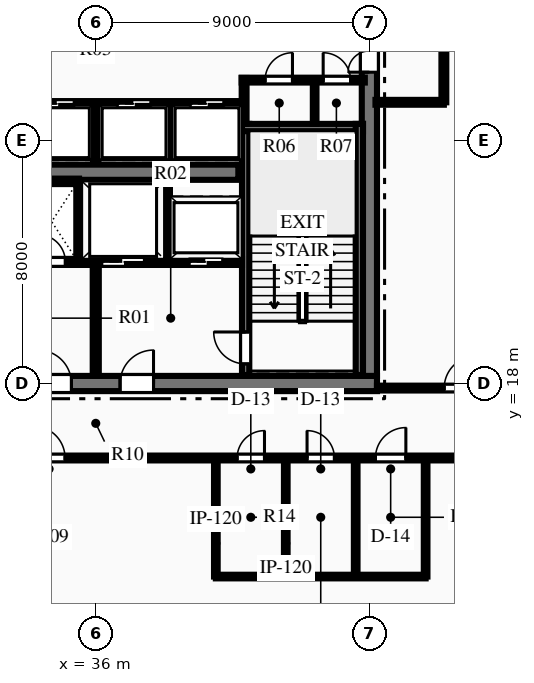
"""IFC4 building model, lengths in metres.
Left out: names, types, materials, properties, quantities, classifications, styles, units other than length and angle.
Written with IfcOpenShell. Run it as: python <this file> out.ifc"""

import sys

from ifc_helpers import new_model, si_unit, direction, frame, frame_2d, origin, place, context, subcontext, project, spatial, rectangle, extrude, element, fill, save


model = new_model("IFC4")
c1 = context("Model", 3, precision=1e-05, world=origin(), true_north=direction((0.0, 1.0)))
c2 = subcontext(c1, "Body", "Model", "MODEL_VIEW")
j1 = project(units=[si_unit("LENGTHUNIT", "METRE"), si_unit("PLANEANGLEUNIT", "RADIAN")], contexts=[c1])
p1 = place(None, origin())
s1 = spatial("IfcSite", under=j1, at=p1, CompositionType="ELEMENT")
p2 = place(p1, origin())
s2 = spatial("IfcBuilding", under=s1, at=p2, CompositionType="ELEMENT")
p3 = place(p2, frame((0.0, 0.0, 155.7)))
s3 = spatial("IfcBuildingStorey", under=s2, at=p3, CompositionType="ELEMENT", Elevation=155.7)
p4 = place(p3, frame((26.75, 18.0, 0.0), z_axis=(0.0, 0.0, 1.0), x_axis=(1.0, 0.0, 0.0)))
e1 = element("IfcWall", 1, at=p4, inside=s3, PredefinedType="SHEAR", context=c2, shape_type="SweptSolid", body=[
    extrude(rectangle(XDim=18.5, YDim=0.5, at=frame_2d((9.25, 0.0))), origin(), (0.0, 0.0, 1.0), 3.75),
])
p5 = place(p4, frame((7.35, 0.0, 0.0)))
e2 = element("IfcOpeningElement", 2, at=p5, cuts=e1, PredefinedType="OPENING", context=c2, shape_type="SweptSolid", body=[
    extrude(rectangle(XDim=1.1, YDim=2.15, at=frame_2d((0.55, 1.075))), frame((0.0, 0.26, 0.0), z_axis=(0.0, -1.0, 0.0), x_axis=(1.0, 0.0, 0.0)), (0.0, 0.0, 1.0), 0.52),
])
p6 = place(p4, frame((10.05, 0.0, 0.0)))
e3 = element("IfcOpeningElement", 3, at=p6, cuts=e1, PredefinedType="OPENING", context=c2, shape_type="SweptSolid", body=[
    extrude(rectangle(XDim=1.1, YDim=2.15, at=frame_2d((0.55, 1.075))), frame((0.0, 0.26, 0.0), z_axis=(0.0, -1.0, 0.0), x_axis=(1.0, 0.0, 0.0)), (0.0, 0.0, 1.0), 0.52),
])
p7 = place(p3, frame((45.0, 18.25, 0.0), z_axis=(0.0, 0.0, 1.0), x_axis=(0.0, 1.0, 0.0)))
e4 = element("IfcWall", 4, at=p7, inside=s3, PredefinedType="SHEAR", context=c2, shape_type="SweptSolid", body=[
    extrude(rectangle(XDim=15.5, YDim=0.5, at=frame_2d((7.75, 0.0))), origin(), (0.0, 0.0, 1.0), 3.75),
])
p8 = place(p7, frame((9.99, 0.0, 0.0)))
e5 = element("IfcOpeningElement", 5, at=p8, cuts=e4, PredefinedType="OPENING", context=c2, shape_type="SweptSolid", body=[
    extrude(rectangle(XDim=1.4, YDim=2.2, at=frame_2d((0.7, 1.1))), frame((0.0, 0.26, 0.0), z_axis=(0.0, -1.0, 0.0), x_axis=(1.0, 0.0, 0.0)), (0.0, 0.0, 1.0), 0.52),
])
p9 = place(p3, frame((31.31, 24.95, 0.0), z_axis=(0.0, 0.0, 1.0), x_axis=(1.0, 0.0, 0.0)))
e6 = element("IfcWall", 6, at=p9, inside=s3, PredefinedType="SHEAR", context=c2, shape_type="SweptSolid", body=[
    extrude(rectangle(XDim=9.38, YDim=0.5, at=frame_2d((4.69, 0.0))), origin(), (0.0, 0.0, 1.0), 3.75),
])
p10 = place(p3, frame((40.93, 18.28, 0.0), z_axis=(0.0, 0.0, 1.0), x_axis=(0.0, 1.0, 0.0)))
e7 = element("IfcWall", 7, at=p10, inside=s3, PredefinedType="SHEAR", context=c2, shape_type="SweptSolid", body=[
    extrude(rectangle(XDim=8.26, YDim=0.24, at=frame_2d((4.13, 0.0))), origin(), (0.0, 0.0, 1.0), 3.75),
])
p11 = place(p10, frame((0.365, 0.0, 0.0)))
e8 = element("IfcOpeningElement", 8, at=p11, cuts=e7, PredefinedType="OPENING", context=c2, shape_type="SweptSolid", body=[
    extrude(rectangle(XDim=1.05, YDim=2.15, at=frame_2d((0.525, 1.075))), frame((0.0, 0.13, 0.0), z_axis=(0.0, -1.0, 0.0), x_axis=(1.0, 0.0, 0.0)), (0.0, 0.0, 1.0), 0.26),
])
p12 = place(p3, frame((40.81, 26.42, 0.0), z_axis=(0.0, 0.0, 1.0), x_axis=(1.0, 0.0, 0.0)))
e9 = element("IfcWall", 9, at=p12, inside=s3, PredefinedType="SHEAR", context=c2, shape_type="SweptSolid", body=[
    extrude(rectangle(XDim=3.98, YDim=0.24, at=frame_2d((1.99, 0.0))), origin(), (0.0, 0.0, 1.0), 3.75),
])
p13 = place(p3, frame((44.67, 18.28, 0.0), z_axis=(0.0, 0.0, 1.0), x_axis=(0.0, 1.0, 0.0)))
e10 = element("IfcWall", 10, at=p13, inside=s3, PredefinedType="SHEAR", context=c2, shape_type="SweptSolid", body=[
    extrude(rectangle(XDim=8.26, YDim=0.24, at=frame_2d((4.13, 0.0))), origin(), (0.0, 0.0, 1.0), 3.75),
])
p14 = place(p3, frame((36.0, 18.28, 0.0), z_axis=(0.0, 0.0, 1.0), x_axis=(0.0, 1.0, 0.0)))
e11 = element("IfcWall", 11, at=p14, inside=s3, PredefinedType="PARTITIONING", context=c2, shape_type="SweptSolid", body=[
    extrude(rectangle(XDim=3.77, YDim=0.2, at=frame_2d((1.885, 0.0))), origin(), (0.0, 0.0, 1.0), 3.46),
])
p15 = place(p3, frame((31.19, 22.0, 0.0), z_axis=(0.0, 0.0, 1.0), x_axis=(1.0, 0.0, 0.0)))
e12 = element("IfcWall", 12, at=p15, inside=s3, PredefinedType="PARTITIONING", context=c2, shape_type="SweptSolid", body=[
    extrude(rectangle(XDim=4.69, YDim=0.2, at=frame_2d((2.345, 0.0))), origin(), (0.0, 0.0, 1.0), 3.46),
])
p16 = place(p15, frame((2.91, 0.0, 0.0)))
e13 = element("IfcOpeningElement", 13, at=p16, cuts=e12, PredefinedType="OPENING", context=c2, shape_type="SweptSolid", body=[
    extrude(rectangle(XDim=0.9, YDim=2.15, at=frame_2d((0.45, 1.075))), frame((0.0, 0.11, 0.0), z_axis=(0.0, -1.0, 0.0), x_axis=(1.0, 0.0, 0.0)), (0.0, 0.0, 1.0), 0.22),
])
p17 = place(p15, frame((0.635, 0.0, 0.0)))
e14 = element("IfcOpeningElement", 14, at=p17, cuts=e12, PredefinedType="OPENING", context=c2, shape_type="SweptSolid", body=[
    extrude(rectangle(XDim=1.1, YDim=2.15, at=frame_2d((0.55, 1.075))), frame((0.0, 0.11, 0.0), z_axis=(0.0, -1.0, 0.0), x_axis=(1.0, 0.0, 0.0)), (0.0, 0.0, 1.0), 0.22),
])
p18 = place(p3, frame((36.12, 22.0, 0.0), z_axis=(0.0, 0.0, 1.0), x_axis=(1.0, 0.0, 0.0)))
e15 = element("IfcWall", 15, at=p18, inside=s3, PredefinedType="PARTITIONING", context=c2, shape_type="SweptSolid", body=[
    extrude(rectangle(XDim=4.69, YDim=0.2, at=frame_2d((2.345, 0.0))), origin(), (0.0, 0.0, 1.0), 3.46),
])
p19 = place(p18, frame((2.955, 0.0, 0.0)))
e16 = element("IfcOpeningElement", 16, at=p19, cuts=e15, PredefinedType="OPENING", context=c2, shape_type="SweptSolid", body=[
    extrude(rectangle(XDim=1.1, YDim=2.15, at=frame_2d((0.55, 1.075))), frame((0.0, 0.11, 0.0), z_axis=(0.0, -1.0, 0.0), x_axis=(1.0, 0.0, 0.0)), (0.0, 0.0, 1.0), 0.22),
])
p20 = place(p18, frame((0.08, 0.0, 0.0)))
e17 = element("IfcOpeningElement", 17, at=p20, cuts=e15, PredefinedType="OPENING", context=c2, shape_type="SweptSolid", body=[
    extrude(rectangle(XDim=1.4, YDim=2.2, at=frame_2d((0.7, 1.1))), frame((0.0, 0.11, 0.0), z_axis=(0.0, -1.0, 0.0), x_axis=(1.0, 0.0, 0.0)), (0.0, 0.0, 1.0), 0.22),
])
p21 = place(p3, frame((35.45, 22.05, 0.0), z_axis=(0.0, 0.0, 1.0), x_axis=(0.0, 1.0, 0.0)))
e18 = element("IfcWall", 18, at=p21, inside=s3, PredefinedType="PARTITIONING", context=c2, shape_type="SweptSolid", body=[
    extrude(rectangle(XDim=2.6, YDim=0.18, at=frame_2d((1.3, 0.0))), origin(), (0.0, 0.0, 1.0), 3.46),
])
p22 = place(p3, frame((33.65, 24.65, 0.0), z_axis=(0.0, 0.0, 1.0), x_axis=(1.0, 0.0, 0.0)))
e19 = element("IfcWall", 19, at=p22, inside=s3, PredefinedType="PARTITIONING", context=c2, shape_type="SweptSolid", body=[
    extrude(rectangle(XDim=1.8, YDim=0.18, at=frame_2d((0.9, 0.0))), origin(), (0.0, 0.0, 1.0), 3.46),
])
p23 = place(p3, frame((38.35, 22.05, 0.0), z_axis=(0.0, 0.0, 1.0), x_axis=(0.0, 1.0, 0.0)))
e20 = element("IfcWall", 20, at=p23, inside=s3, PredefinedType="PARTITIONING", context=c2, shape_type="SweptSolid", body=[
    extrude(rectangle(XDim=2.6, YDim=0.18, at=frame_2d((1.3, 0.0))), origin(), (0.0, 0.0, 1.0), 3.46),
])
p24 = place(p3, frame((40.8, 27.98, 0.0), z_axis=(0.0, 0.0, 1.0), x_axis=(1.0, 0.0, 0.0)))
e21 = element("IfcWall", 21, at=p24, inside=s3, PredefinedType="PARTITIONING", context=c2, shape_type="SweptSolid", body=[
    extrude(rectangle(XDim=4.05, YDim=0.16, at=frame_2d((2.025, 0.0))), origin(), (0.0, 0.0, 1.0), 3.46),
])
p25 = place(p24, frame((0.77, 0.0, 0.0)))
e22 = element("IfcOpeningElement", 22, at=p25, cuts=e21, PredefinedType="OPENING", context=c2, shape_type="SweptSolid", body=[
    extrude(rectangle(XDim=0.9, YDim=2.15, at=frame_2d((0.45, 1.075))), frame((0.0, 0.09, 0.0), z_axis=(0.0, -1.0, 0.0), x_axis=(1.0, 0.0, 0.0)), (0.0, 0.0, 1.0), 0.18),
])
p26 = place(p24, frame((2.68, 0.0, 0.0)))
e23 = element("IfcOpeningElement", 23, at=p26, cuts=e21, PredefinedType="OPENING", context=c2, shape_type="SweptSolid", body=[
    extrude(rectangle(XDim=0.9, YDim=2.15, at=frame_2d((0.45, 1.075))), frame((0.0, 0.09, 0.0), z_axis=(0.0, -1.0, 0.0), x_axis=(1.0, 0.0, 0.0)), (0.0, 0.0, 1.0), 0.18),
])
p27 = place(p3, frame((40.88, 26.54, 0.0), z_axis=(0.0, 0.0, 1.0), x_axis=(0.0, 1.0, 0.0)))
e24 = element("IfcWall", 24, at=p27, inside=s3, PredefinedType="PARTITIONING", context=c2, shape_type="SweptSolid", body=[
    extrude(rectangle(XDim=1.51, YDim=0.16, at=frame_2d((0.755, 0.0))), origin(), (0.0, 0.0, 1.0), 3.46),
])
p28 = place(p3, frame((43.2, 26.54, 0.0), z_axis=(0.0, 0.0, 1.0), x_axis=(0.0, 1.0, 0.0)))
e25 = element("IfcWall", 25, at=p28, inside=s3, PredefinedType="PARTITIONING", context=c2, shape_type="SweptSolid", body=[
    extrude(rectangle(XDim=1.44, YDim=0.12, at=frame_2d((0.72, 0.0))), origin(), (0.0, 0.0, 1.0), 3.46),
])
p29 = place(p3, frame((31.2, 27.2, 0.0), z_axis=(0.0, 0.0, 1.0), x_axis=(1.0, 0.0, 0.0)))
e26 = element("IfcWall", 26, at=p29, inside=s3, PredefinedType="PARTITIONING", context=c2, shape_type="SweptSolid", body=[
    extrude(rectangle(XDim=9.6, YDim=0.18, at=frame_2d((4.8, 0.0))), origin(), (0.0, 0.0, 1.0), 3.46),
])
p30 = place(p29, frame((0.59, 0.0, 0.0)))
e27 = element("IfcOpeningElement", 27, at=p30, cuts=e26, PredefinedType="OPENING", context=c2, shape_type="SweptSolid", body=[
    extrude(rectangle(XDim=1.1, YDim=2.15, at=frame_2d((0.55, 1.075))), frame((0.0, 0.1, 0.0), z_axis=(0.0, -1.0, 0.0), x_axis=(1.0, 0.0, 0.0)), (0.0, 0.0, 1.0), 0.2),
])
p31 = place(p29, frame((2.99, 0.0, 0.0)))
e28 = element("IfcOpeningElement", 28, at=p31, cuts=e26, PredefinedType="OPENING", context=c2, shape_type="SweptSolid", body=[
    extrude(rectangle(XDim=1.1, YDim=2.15, at=frame_2d((0.55, 1.075))), frame((0.0, 0.1, 0.0), z_axis=(0.0, -1.0, 0.0), x_axis=(1.0, 0.0, 0.0)), (0.0, 0.0, 1.0), 0.2),
])
p32 = place(p29, frame((5.51, 0.0, 0.0)))
e29 = element("IfcOpeningElement", 29, at=p32, cuts=e26, PredefinedType="OPENING", context=c2, shape_type="SweptSolid", body=[
    extrude(rectangle(XDim=1.1, YDim=2.15, at=frame_2d((0.55, 1.075))), frame((0.0, 0.1, 0.0), z_axis=(0.0, -1.0, 0.0), x_axis=(1.0, 0.0, 0.0)), (0.0, 0.0, 1.0), 0.2),
])
p33 = place(p29, frame((7.91, 0.0, 0.0)))
e30 = element("IfcOpeningElement", 30, at=p33, cuts=e26, PredefinedType="OPENING", context=c2, shape_type="SweptSolid", body=[
    extrude(rectangle(XDim=1.1, YDim=2.15, at=frame_2d((0.55, 1.075))), frame((0.0, 0.1, 0.0), z_axis=(0.0, -1.0, 0.0), x_axis=(1.0, 0.0, 0.0)), (0.0, 0.0, 1.0), 0.2),
])
for number, where, z_axis, x_axis in (
    (31, (36.0, 25.3, 0.0), (0.0, 0.0, 1.0), (0.0, 1.0, 0.0)),
    (32, (38.46, 25.3, 0.0), (0.0, 0.0, 1.0), (0.0, 1.0, 0.0)),
):
    element("IfcWall", number, at=place(p3, frame(where, z_axis=z_axis, x_axis=x_axis)), inside=s3, PredefinedType="PARTITIONING", context=c2, shape_type="SweptSolid", body=[
        extrude(rectangle(XDim=1.9, YDim=0.18, at=frame_2d((0.95, 0.0))), origin(), (0.0, 0.0, 1.0), 3.46),
    ])
p34 = place(p3, frame((18.2, 15.55, 0.0), z_axis=(0.0, 0.0, 1.0), x_axis=(1.0, 0.0, 0.0)))
e33 = element("IfcWall", 33, at=p34, inside=s3, PredefinedType="PARTITIONING", context=c2, shape_type="SweptSolid", body=[
    extrude(rectangle(XDim=35.6, YDim=0.16, at=frame_2d((17.8, 0.0))), origin(), (0.0, 0.0, 1.0), 3.46),
])
p35 = place(p34, frame((22.45, 0.0, 0.0)))
e34 = element("IfcOpeningElement", 34, at=p35, cuts=e33, PredefinedType="OPENING", context=c2, shape_type="SweptSolid", body=[
    extrude(rectangle(XDim=0.9, YDim=2.15, at=frame_2d((0.45, 1.075))), frame((0.0, 0.09, 0.0), z_axis=(0.0, -1.0, 0.0), x_axis=(1.0, 0.0, 0.0)), (0.0, 0.0, 1.0), 0.18),
])
p36 = place(p34, frame((24.75, 0.0, 0.0)))
e35 = element("IfcOpeningElement", 35, at=p36, cuts=e33, PredefinedType="OPENING", context=c2, shape_type="SweptSolid", body=[
    extrude(rectangle(XDim=0.9, YDim=2.15, at=frame_2d((0.45, 1.075))), frame((0.0, 0.09, 0.0), z_axis=(0.0, -1.0, 0.0), x_axis=(1.0, 0.0, 0.0)), (0.0, 0.0, 1.0), 0.18),
])
p37 = place(p34, frame((27.0, 0.0, 0.0)))
e36 = element("IfcOpeningElement", 36, at=p37, cuts=e33, PredefinedType="OPENING", context=c2, shape_type="SweptSolid", body=[
    extrude(rectangle(XDim=1.0, YDim=2.15, at=frame_2d((0.5, 1.075))), frame((0.0, 0.09, 0.0), z_axis=(0.0, -1.0, 0.0), x_axis=(1.0, 0.0, 0.0)), (0.0, 0.0, 1.0), 0.18),
])
p38 = place(p34, frame((1.945, 0.0, 0.0)))
e37 = element("IfcOpeningElement", 37, at=p38, cuts=e33, PredefinedType="OPENING", context=c2, shape_type="SweptSolid", body=[
    extrude(rectangle(XDim=1.05, YDim=2.15, at=frame_2d((0.525, 1.075))), frame((0.0, 0.09, 0.0), z_axis=(0.0, -1.0, 0.0), x_axis=(1.0, 0.0, 0.0)), (0.0, 0.0, 1.0), 0.18),
])
p39 = place(p34, frame((7.995, 0.0, 0.0)))
e38 = element("IfcOpeningElement", 38, at=p39, cuts=e33, PredefinedType="OPENING", context=c2, shape_type="SweptSolid", body=[
    extrude(rectangle(XDim=1.05, YDim=2.15, at=frame_2d((0.525, 1.075))), frame((0.0, 0.09, 0.0), z_axis=(0.0, -1.0, 0.0), x_axis=(1.0, 0.0, 0.0)), (0.0, 0.0, 1.0), 0.18),
])
p40 = place(p34, frame((15.74, 0.0, 0.0)))
e39 = element("IfcOpeningElement", 39, at=p40, cuts=e33, PredefinedType="OPENING", context=c2, shape_type="SweptSolid", body=[
    extrude(rectangle(XDim=1.05, YDim=2.15, at=frame_2d((0.525, 1.075))), frame((0.0, 0.09, 0.0), z_axis=(0.0, -1.0, 0.0), x_axis=(1.0, 0.0, 0.0)), (0.0, 0.0, 1.0), 0.18),
])
p41 = place(p3, frame((45.25, 17.85, 0.0), z_axis=(0.0, 0.0, 1.0), x_axis=(1.0, 0.0, 0.0)))
e40 = element("IfcWall", 40, at=p41, inside=s3, PredefinedType="PARTITIONING", context=c2, shape_type="SweptSolid", body=[
    extrude(rectangle(XDim=8.55, YDim=0.16, at=frame_2d((4.275, 0.0))), origin(), (0.0, 0.0, 1.0), 2.998),
])
p42 = place(p41, frame((2.211, 0.0, 0.0)))
e41 = element("IfcOpeningElement", 41, at=p42, cuts=e40, PredefinedType="OPENING", context=c2, shape_type="SweptSolid", body=[
    extrude(rectangle(XDim=1.05, YDim=2.15, at=frame_2d((0.525, 1.075))), frame((0.0, 0.09, 0.0), z_axis=(0.0, -1.0, 0.0), x_axis=(1.0, 0.0, 0.0)), (0.0, 0.0, 1.0), 0.18),
])
p43 = place(p3, frame((47.45, 27.25, 0.0), z_axis=(0.0, 0.0, 1.0), x_axis=(0.0, 1.0, 0.0)))
e42 = element("IfcWall", 42, at=p43, inside=s3, PredefinedType="PARTITIONING", context=c2, shape_type="SweptSolid", body=[
    extrude(rectangle(XDim=6.9, YDim=0.16, at=frame_2d((3.45, 0.0))), origin(), (0.0, 0.0, 1.0), 3.46),
])
p44 = place(p3, frame((45.2, 27.25, 0.0), z_axis=(0.0, 0.0, 1.0), x_axis=(1.0, 0.0, 0.0)))
e43 = element("IfcWall", 43, at=p44, inside=s3, PredefinedType="PARTITIONING", context=c2, shape_type="SweptSolid", body=[
    extrude(rectangle(XDim=2.25, YDim=0.16, at=frame_2d((1.125, 0.0))), origin(), (0.0, 0.0, 1.0), 3.46),
])
p45 = place(p3, frame((39.95, 11.65, 0.0), z_axis=(0.0, 0.0, 1.0), x_axis=(0.0, 1.0, 0.0)))
e44 = element("IfcWall", 44, at=p45, inside=s3, PredefinedType="PARTITIONING", context=c2, shape_type="SweptSolid", body=[
    extrude(rectangle(XDim=3.9, YDim=0.12, at=frame_2d((1.95, 0.0))), origin(), (0.0, 0.0, 1.0), 2.839),
])
for number, where, z_axis, x_axis in (
    (45, (42.25, 11.65, 0.0), (0.0, 0.0, 1.0), (0.0, 1.0, 0.0)),
    (46, (44.55, 11.65, 0.0), (0.0, 0.0, 1.0), (0.0, 1.0, 0.0)),
    (47, (46.85, 11.65, 0.0), (0.0, 0.0, 1.0), (0.0, 1.0, 0.0)),
):
    element("IfcWall", number, at=place(p3, frame(where, z_axis=z_axis, x_axis=x_axis)), inside=s3, PredefinedType="PARTITIONING", context=c2, shape_type="SweptSolid", body=[
        extrude(rectangle(XDim=3.9, YDim=0.12, at=frame_2d((1.95, 0.0))), origin(), (0.0, 0.0, 1.0), 3.46),
    ])
p46 = place(p3, frame((39.95, 11.65, 0.0), z_axis=(0.0, 0.0, 1.0), x_axis=(1.0, 0.0, 0.0)))
e48 = element("IfcWall", 48, at=p46, inside=s3, PredefinedType="PARTITIONING", context=c2, shape_type="SweptSolid", body=[
    extrude(rectangle(XDim=6.9, YDim=0.12, at=frame_2d((3.45, 0.0))), origin(), (0.0, 0.0, 1.0), 3.46),
])
p47 = place(p25, origin())
e49 = element("IfcDoor", 49, at=p47, inside=s3, OperationType="SINGLE_SWING_RIGHT", PredefinedType="DOOR", context=c2, shape_type="SweptSolid", body=[
    extrude(rectangle(XDim=0.9, YDim=2.15, at=frame_2d((0.45, 1.075))), frame((0.0, 0.025, 0.0), z_axis=(0.0, -1.0, 0.0), x_axis=(1.0, 0.0, 0.0)), (0.0, 0.0, 1.0), 0.05),
])
fill(e22, e49)
p48 = place(p26, origin())
e50 = element("IfcDoor", 50, at=p48, inside=s3, OperationType="SINGLE_SWING_LEFT", PredefinedType="DOOR", context=c2, shape_type="SweptSolid", body=[
    extrude(rectangle(XDim=0.9, YDim=2.15, at=frame_2d((0.45, 1.075))), frame((0.0, 0.025, 0.0), z_axis=(0.0, -1.0, 0.0), x_axis=(1.0, 0.0, 0.0)), (0.0, 0.0, 1.0), 0.05),
])
fill(e23, e50)
p49 = place(p11, origin())
e51 = element("IfcDoor", 51, at=p49, inside=s3, OperationType="SINGLE_SWING_RIGHT", PredefinedType="DOOR", context=c2, shape_type="SweptSolid", body=[
    extrude(rectangle(XDim=1.05, YDim=2.15, at=frame_2d((0.525, 1.075))), frame((0.0, 0.025, 0.0), z_axis=(0.0, -1.0, 0.0), x_axis=(1.0, 0.0, 0.0)), (0.0, 0.0, 1.0), 0.05),
])
fill(e8, e51)
p50 = place(p5, origin())
e52 = element("IfcDoor", 52, at=p50, inside=s3, OperationType="SINGLE_SWING_LEFT", PredefinedType="DOOR", context=c2, shape_type="SweptSolid", body=[
    extrude(rectangle(XDim=1.1, YDim=2.15, at=frame_2d((0.55, 1.075))), frame((0.0, 0.025, 0.0), z_axis=(0.0, -1.0, 0.0), x_axis=(1.0, 0.0, 0.0)), (0.0, 0.0, 1.0), 0.05),
])
fill(e2, e52)
p51 = place(p6, origin())
e53 = element("IfcDoor", 53, at=p51, inside=s3, OperationType="SINGLE_SWING_RIGHT", PredefinedType="DOOR", context=c2, shape_type="SweptSolid", body=[
    extrude(rectangle(XDim=1.1, YDim=2.15, at=frame_2d((0.55, 1.075))), frame((0.0, 0.025, 0.0), z_axis=(0.0, -1.0, 0.0), x_axis=(1.0, 0.0, 0.0)), (0.0, 0.0, 1.0), 0.05),
])
fill(e3, e53)
p52 = place(p16, origin())
e54 = element("IfcDoor", 54, at=p52, inside=s3, OperationType="SINGLE_SWING_LEFT", PredefinedType="DOOR", context=c2, shape_type="SweptSolid", body=[
    extrude(rectangle(XDim=0.9, YDim=2.15, at=frame_2d((0.45, 1.075))), frame((0.0, 0.025, 0.0), z_axis=(0.0, -1.0, 0.0), x_axis=(1.0, 0.0, 0.0)), (0.0, 0.0, 1.0), 0.05),
])
fill(e13, e54)
p53 = place(p8, origin())
e55 = element("IfcDoor", 55, at=p53, inside=s3, OperationType="DOUBLE_DOOR_SINGLE_SWING", PredefinedType="DOOR", context=c2, shape_type="SweptSolid", body=[
    extrude(rectangle(XDim=1.4, YDim=2.2, at=frame_2d((0.7, 1.1))), frame((0.0, 0.025, 0.0), z_axis=(0.0, -1.0, 0.0), x_axis=(1.0, 0.0, 0.0)), (0.0, 0.0, 1.0), 0.05),
])
fill(e5, e55)
p54 = place(p35, origin())
e56 = element("IfcDoor", 56, at=p54, inside=s3, OperationType="SINGLE_SWING_RIGHT", PredefinedType="DOOR", context=c2, shape_type="SweptSolid", body=[
    extrude(rectangle(XDim=0.9, YDim=2.15, at=frame_2d((0.45, 1.075))), frame((0.0, 0.025, 0.0), z_axis=(0.0, -1.0, 0.0), x_axis=(1.0, 0.0, 0.0)), (0.0, 0.0, 1.0), 0.05),
])
fill(e34, e56)
p55 = place(p36, origin())
e57 = element("IfcDoor", 57, at=p55, inside=s3, OperationType="SINGLE_SWING_LEFT", PredefinedType="DOOR", context=c2, shape_type="SweptSolid", body=[
    extrude(rectangle(XDim=0.9, YDim=2.15, at=frame_2d((0.45, 1.075))), frame((0.0, 0.025, 0.0), z_axis=(0.0, -1.0, 0.0), x_axis=(1.0, 0.0, 0.0)), (0.0, 0.0, 1.0), 0.05),
])
fill(e35, e57)
p56 = place(p37, origin())
e58 = element("IfcDoor", 58, at=p56, inside=s3, OperationType="SINGLE_SWING_RIGHT", PredefinedType="DOOR", context=c2, shape_type="SweptSolid", body=[
    extrude(rectangle(XDim=1.0, YDim=2.15, at=frame_2d((0.5, 1.075))), frame((0.0, 0.025, 0.0), z_axis=(0.0, -1.0, 0.0), x_axis=(1.0, 0.0, 0.0)), (0.0, 0.0, 1.0), 0.05),
])
fill(e36, e58)
p57 = place(p40, origin())
e59 = element("IfcDoor", 59, at=p57, inside=s3, OperationType="SINGLE_SWING_LEFT", PredefinedType="DOOR", context=c2, shape_type="SweptSolid", body=[
    extrude(rectangle(XDim=1.05, YDim=2.15, at=frame_2d((0.525, 1.075))), frame((0.0, 0.025, 0.0), z_axis=(0.0, -1.0, 0.0), x_axis=(1.0, 0.0, 0.0)), (0.0, 0.0, 1.0), 0.05),
])
fill(e39, e59)
p58 = place(p42, origin())
e60 = element("IfcDoor", 60, at=p58, inside=s3, OperationType="SINGLE_SWING_RIGHT", PredefinedType="DOOR", context=c2, shape_type="SweptSolid", body=[
    extrude(rectangle(XDim=1.05, YDim=2.15, at=frame_2d((0.525, 1.075))), frame((0.0, 0.025, 0.0), z_axis=(0.0, -1.0, 0.0), x_axis=(1.0, 0.0, 0.0)), (0.0, 0.0, 1.0), 0.05),
])
fill(e41, e60)
p59 = place(p31, origin())
e61 = element("IfcDoor", 61, at=p59, inside=s3, OperationType="SLIDING_TO_LEFT", PredefinedType="DOOR", context=c2, shape_type="SweptSolid", body=[
    extrude(rectangle(XDim=1.1, YDim=2.15, at=frame_2d((0.55, 1.075))), frame((0.0, 0.025, 0.0), z_axis=(0.0, -1.0, 0.0), x_axis=(1.0, 0.0, 0.0)), (0.0, 0.0, 1.0), 0.05),
])
fill(e28, e61)
p60 = place(p32, origin())
e62 = element("IfcDoor", 62, at=p60, inside=s3, OperationType="SLIDING_TO_LEFT", PredefinedType="DOOR", context=c2, shape_type="SweptSolid", body=[
    extrude(rectangle(XDim=1.1, YDim=2.15, at=frame_2d((0.55, 1.075))), frame((0.0, 0.025, 0.0), z_axis=(0.0, -1.0, 0.0), x_axis=(1.0, 0.0, 0.0)), (0.0, 0.0, 1.0), 0.05),
])
fill(e29, e62)
p61 = place(p33, origin())
e63 = element("IfcDoor", 63, at=p61, inside=s3, OperationType="SLIDING_TO_LEFT", PredefinedType="DOOR", context=c2, shape_type="SweptSolid", body=[
    extrude(rectangle(XDim=1.1, YDim=2.15, at=frame_2d((0.55, 1.075))), frame((0.0, 0.025, 0.0), z_axis=(0.0, -1.0, 0.0), x_axis=(1.0, 0.0, 0.0)), (0.0, 0.0, 1.0), 0.05),
])
fill(e30, e63)
p62 = place(p19, origin())
e64 = element("IfcDoor", 64, at=p62, inside=s3, OperationType="SLIDING_TO_LEFT", PredefinedType="DOOR", context=c2, shape_type="SweptSolid", body=[
    extrude(rectangle(XDim=1.1, YDim=2.15, at=frame_2d((0.55, 1.075))), frame((0.0, 0.025, 0.0), z_axis=(0.0, -1.0, 0.0), x_axis=(1.0, 0.0, 0.0)), (0.0, 0.0, 1.0), 0.05),
])
fill(e16, e64)
p63 = place(p20, origin())
e65 = element("IfcDoor", 65, at=p63, inside=s3, OperationType="SLIDING_TO_LEFT", PredefinedType="DOOR", context=c2, shape_type="SweptSolid", body=[
    extrude(rectangle(XDim=1.4, YDim=2.2, at=frame_2d((0.7, 1.1))), frame((0.0, 0.025, 0.0), z_axis=(0.0, -1.0, 0.0), x_axis=(1.0, 0.0, 0.0)), (0.0, 0.0, 1.0), 0.05),
])
fill(e17, e65)
save(model, sys.argv[1])
